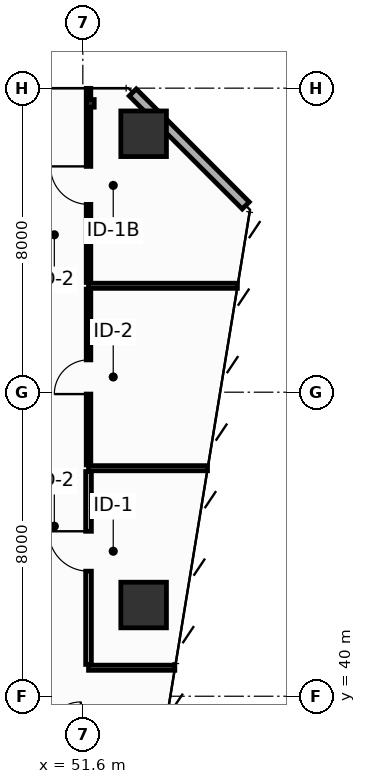
"""IFC4 building model, lengths in metres.
Left out: names, types, materials, properties, quantities, classifications, styles, units other than length and angle.
Written with IfcOpenShell. Run it as: python <this file> out.ifc"""

import sys

from ifc_helpers import new_model, si_unit, direction, frame, frame_2d, origin, origin_2d, place, context, subcontext, project, spatial, rectangle, hollow_rectangle, extrude, element, fill, save


model = new_model("IFC4")
c1 = context("Model", 3, precision=1e-05, world=origin(), true_north=direction((0.0, 1.0)))
c2 = subcontext(c1, "Body", "Model", "MODEL_VIEW")
j1 = project(units=[si_unit("LENGTHUNIT", "METRE"), si_unit("PLANEANGLEUNIT", "RADIAN")], contexts=[c1])
p1 = place(None, origin())
s1 = spatial("IfcSite", under=j1, at=p1, CompositionType="ELEMENT")
p2 = place(p1, origin())
s2 = spatial("IfcBuilding", under=s1, at=p2, CompositionType="ELEMENT")
p3 = place(p2, frame((0.0, 0.0, 38.4)))
s3 = spatial("IfcBuildingStorey", under=s2, at=p3, CompositionType="ELEMENT", Elevation=38.4)
for number, where, z_axis, x_axis in (
    (1, (53.2, 54.8, 0.0), (0.0, 0.0, 1.0), (1.0, 0.0, 0.0)),
    (2, (53.2, 42.4, 0.0), (0.0, 0.0, 1.0), (1.0, 0.0, 0.0)),
):
    element("IfcColumn", number, at=place(p3, frame(where, z_axis=z_axis, x_axis=x_axis)), inside=s3, PredefinedType="COLUMN", context=c2, shape_type="SweptSolid", body=[
        extrude(hollow_rectangle(XDim=1.2, YDim=1.2, WallThickness=0.055, at=origin_2d()), origin(), (0.0, 0.0, 1.0), 4.4),
    ])
p4 = place(p3, frame((51.8, 55.6, 0.0), z_axis=(0.0, 0.0, 1.0), x_axis=(1.0, 0.0, 0.0)))
e3 = element("IfcColumn", 3, at=p4, inside=s3, PredefinedType="PILASTER", context=c2, shape_type="SweptSolid", body=[
    extrude(hollow_rectangle(XDim=0.2, YDim=0.2, WallThickness=0.01, at=origin_2d()), origin(), (0.0, 0.0, 1.0), 4.4),
])
p5 = place(p3, frame((55.887, 52.913, 0.0), z_axis=(0.0, 0.0, 1.0), x_axis=(-0.707106781187, 0.707106781187, 0.0)))
e4 = element("IfcWall", 4, at=p5, inside=s3, PredefinedType="STANDARD", context=c2, shape_type="SweptSolid", body=[
    extrude(rectangle(XDim=4.206, YDim=0.26, at=frame_2d((2.103, 0.0))), origin(), (0.0, 0.0, 1.0), 4.15),
])
p6 = place(p3, frame((51.75, 40.75, 0.0), z_axis=(0.0, 0.0, 1.0), x_axis=(1.0, 0.0, 0.0)))
e5 = element("IfcWall", 5, at=p6, inside=s3, PredefinedType="PARTITIONING", context=c2, shape_type="SweptSolid", body=[
    extrude(rectangle(XDim=2.271, YDim=0.135, at=frame_2d((1.135, 0.0))), origin(), (0.0, 0.0, 1.0), 3.635),
])
p7 = place(p3, frame((51.75, 46.0, 0.0), z_axis=(0.0, 0.0, 1.0), x_axis=(1.0, 0.0, 0.0)))
e6 = element("IfcWall", 6, at=p7, inside=s3, PredefinedType="PARTITIONING", context=c2, shape_type="SweptSolid", body=[
    extrude(rectangle(XDim=3.131, YDim=0.135, at=frame_2d((1.565, 0.0))), origin(), (0.0, 0.0, 1.0), 3.335),
])
p8 = place(p3, frame((51.75, 50.8, 0.0), z_axis=(0.0, 0.0, 1.0), x_axis=(1.0, 0.0, 0.0)))
e7 = element("IfcWall", 7, at=p8, inside=s3, PredefinedType="PARTITIONING", context=c2, shape_type="SweptSolid", body=[
    extrude(rectangle(XDim=3.917, YDim=0.135, at=frame_2d((1.958, 0.0))), origin(), (0.0, 0.0, 1.0), 3.335),
])
p9 = place(p3, frame((51.75, 40.837, 0.0), z_axis=(0.0, 0.0, 1.0), x_axis=(0.0, 1.0, 0.0)))
e8 = element("IfcWall", 8, at=p9, inside=s3, PredefinedType="PARTITIONING", context=c2, shape_type="SweptSolid", body=[
    extrude(rectangle(XDim=5.075, YDim=0.15, at=frame_2d((2.538, 0.0))), origin(), (0.0, 0.0, 1.0), 3.335),
])
p10 = place(p9, frame((2.453, 0.0, 0.0)))
e9 = element("IfcOpeningElement", 9, at=p10, cuts=e8, PredefinedType="OPENING", context=c2, shape_type="SweptSolid", body=[
    extrude(rectangle(XDim=1.05, YDim=2.15, at=frame_2d((0.525, 1.075))), frame((0.0, 0.085, 0.0), z_axis=(0.0, -1.0, 0.0), x_axis=(1.0, 0.0, 0.0)), (0.0, 0.0, 1.0), 0.17),
])
p11 = place(p3, frame((51.75, 46.087, 0.0), z_axis=(0.0, 0.0, 1.0), x_axis=(0.0, 1.0, 0.0)))
e10 = element("IfcWall", 10, at=p11, inside=s3, PredefinedType="PARTITIONING", context=c2, shape_type="SweptSolid", body=[
    extrude(rectangle(XDim=4.625, YDim=0.12, at=frame_2d((2.312, 0.0))), origin(), (0.0, 0.0, 1.0), 4.15),
])
p12 = place(p11, frame((1.863, 0.0, 0.0)))
e11 = element("IfcOpeningElement", 11, at=p12, cuts=e10, PredefinedType="OPENING", context=c2, shape_type="SweptSolid", body=[
    extrude(rectangle(XDim=0.9, YDim=2.1, at=frame_2d((0.45, 1.05))), frame((0.0, 0.07, 0.0), z_axis=(0.0, -1.0, 0.0), x_axis=(1.0, 0.0, 0.0)), (0.0, 0.0, 1.0), 0.14),
])
p13 = place(p3, frame((51.75, 50.887, 0.0), z_axis=(0.0, 0.0, 1.0), x_axis=(0.0, 1.0, 0.0)))
e12 = element("IfcWall", 12, at=p13, inside=s3, PredefinedType="PARTITIONING", context=c2, shape_type="SweptSolid", body=[
    extrude(rectangle(XDim=5.108, YDim=0.12, at=frame_2d((2.554, 0.0))), origin(), (0.0, 0.0, 1.0), 3.435),
])
p14 = place(p13, frame((2.054, 0.0, 0.0)))
e13 = element("IfcOpeningElement", 13, at=p14, cuts=e12, PredefinedType="OPENING", context=c2, shape_type="SweptSolid", body=[
    extrude(rectangle(XDim=1.0, YDim=2.15, at=frame_2d((0.5, 1.075))), frame((0.0, 0.07, 0.0), z_axis=(0.0, -1.0, 0.0), x_axis=(1.0, 0.0, 0.0)), (0.0, 0.0, 1.0), 0.14),
])
p15 = place(p10, origin())
e14 = element("IfcDoor", 14, at=p15, inside=s3, OperationType="SINGLE_SWING_RIGHT", PredefinedType="DOOR", context=c2, shape_type="SweptSolid", body=[
    extrude(rectangle(XDim=1.05, YDim=2.15, at=frame_2d((0.525, 1.075))), frame((0.0, 0.025, 0.0), z_axis=(0.0, -1.0, 0.0), x_axis=(1.0, 0.0, 0.0)), (0.0, 0.0, 1.0), 0.05),
])
fill(e9, e14)
p16 = place(p12, origin())
e15 = element("IfcDoor", 15, at=p16, inside=s3, OperationType="SINGLE_SWING_LEFT", PredefinedType="DOOR", context=c2, shape_type="SweptSolid", body=[
    extrude(rectangle(XDim=0.9, YDim=2.1, at=frame_2d((0.45, 1.05))), frame((0.0, 0.025, 0.0), z_axis=(0.0, -1.0, 0.0), x_axis=(1.0, 0.0, 0.0)), (0.0, 0.0, 1.0), 0.05),
])
fill(e11, e15)
p17 = place(p14, origin())
e16 = element("IfcDoor", 16, at=p17, inside=s3, OperationType="SINGLE_SWING_RIGHT", PredefinedType="DOOR", context=c2, shape_type="SweptSolid", body=[
    extrude(rectangle(XDim=1.0, YDim=2.15, at=frame_2d((0.5, 1.075))), frame((0.0, 0.025, 0.0), z_axis=(0.0, -1.0, 0.0), x_axis=(1.0, 0.0, 0.0)), (0.0, 0.0, 1.0), 0.05),
])
fill(e13, e16)
save(model, sys.argv[1])
